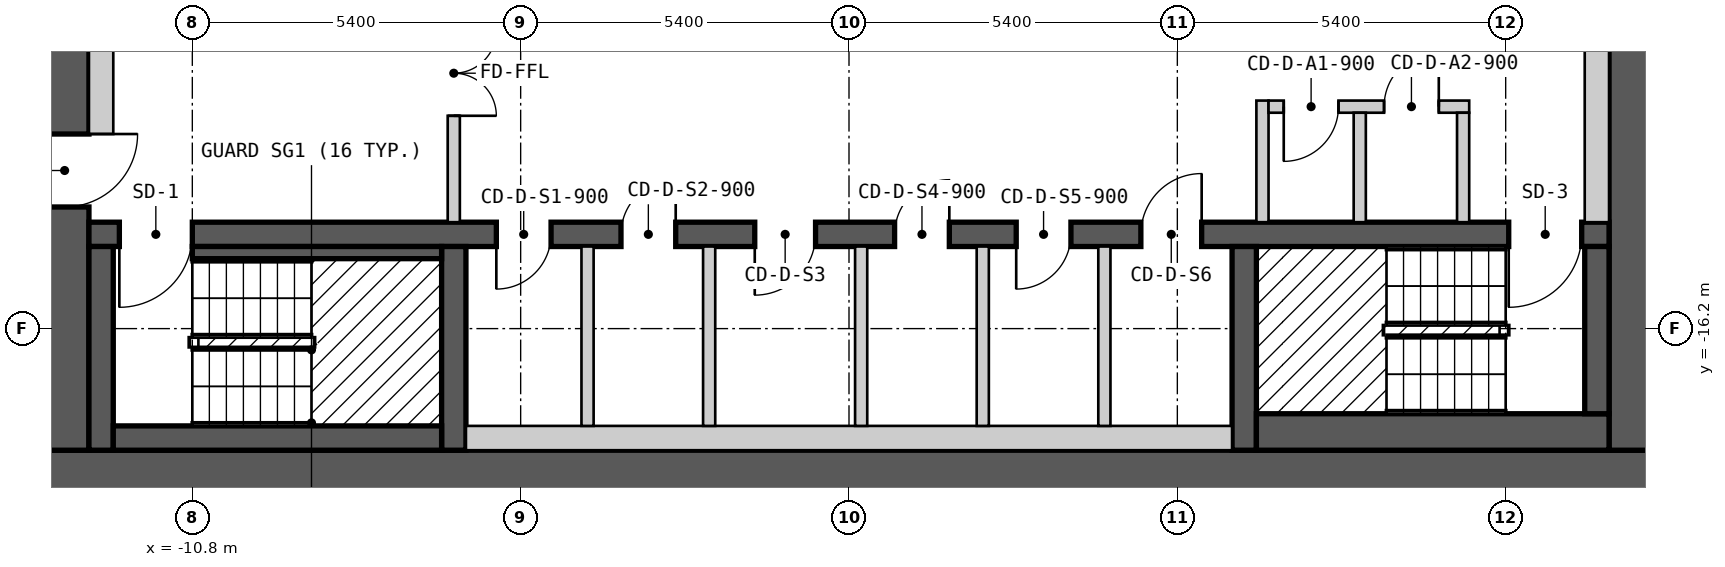
"""IFC4 building model, lengths in metres.
Left out: names, types, materials, properties, quantities, classifications, styles, units other than length and angle.
Written with IfcOpenShell. Run it as: python <this file> out.ifc"""

import sys

from ifc_helpers import new_model, si_unit, direction, frame, frame_2d, origin, place, context, subcontext, project, spatial, rectangle, extrude, element, fill, save


model = new_model("IFC4")
c1 = context("Model", 3, precision=1e-05, world=origin(), true_north=direction((0.0, 1.0)))
c2 = subcontext(c1, "Body", "Model", "MODEL_VIEW")
j1 = project(units=[si_unit("LENGTHUNIT", "METRE"), si_unit("PLANEANGLEUNIT", "RADIAN")], contexts=[c1])
p1 = place(None, origin())
s1 = spatial("IfcSite", under=j1, at=p1, CompositionType="ELEMENT")
p2 = place(p1, origin())
s2 = spatial("IfcBuilding", under=s1, at=p2, CompositionType="ELEMENT")
p3 = place(p2, frame((0.0, 0.0, 135.6)))
s3 = spatial("IfcBuildingStorey", under=s2, at=p3, CompositionType="ELEMENT", Elevation=135.6)
p4 = place(p3, frame((-13.3, -18.6, 0.0), z_axis=(0.0, 0.0, 1.0), x_axis=(1.0, 0.0, 0.0)))
e1 = element("IfcWall", 1, at=p4, inside=s3, PredefinedType="SHEAR", context=c2, shape_type="SweptSolid", body=[
    extrude(rectangle(XDim=26.6, YDim=0.8, at=frame_2d((13.3, 0.0))), origin(), (0.0, 0.0, 1.0), 2.7),
])
p5 = place(p3, frame((-12.9, -18.2, 0.0), z_axis=(0.0, 0.0, 1.0), x_axis=(0.0, 1.0, 0.0)))
e2 = element("IfcWall", 2, at=p5, inside=s3, PredefinedType="SHEAR", context=c2, shape_type="SweptSolid", body=[
    extrude(rectangle(XDim=12.4, YDim=0.8, at=frame_2d((6.2, 0.0))), origin(), (0.0, 0.0, 1.0), 2.7),
])
p6 = place(p5, frame((4.0, 0.0, 0.0)))
e3 = element("IfcOpeningElement", 3, at=p6, cuts=e2, PredefinedType="OPENING", context=c2, shape_type="SweptSolid", body=[
    extrude(rectangle(XDim=1.2, YDim=2.1, at=frame_2d((0.6, 1.05))), frame((0.0, 0.41, 0.0), z_axis=(0.0, -1.0, 0.0), x_axis=(1.0, 0.0, 0.0)), (0.0, 0.0, 1.0), 0.82),
])
p7 = place(p3, frame((12.9, -18.2, 0.0), z_axis=(0.0, 0.0, 1.0), x_axis=(0.0, 1.0, 0.0)))
e4 = element("IfcWall", 4, at=p7, inside=s3, PredefinedType="SHEAR", context=c2, shape_type="SweptSolid", body=[
    extrude(rectangle(XDim=12.4, YDim=0.8, at=frame_2d((6.2, 0.0))), origin(), (0.0, 0.0, 1.0), 2.7),
])
p8 = place(p3, frame((-12.5, -14.65, 0.0), z_axis=(0.0, 0.0, 1.0), x_axis=(1.0, 0.0, 0.0)))
e5 = element("IfcWall", 5, at=p8, inside=s3, PredefinedType="SHEAR", context=c2, shape_type="SweptSolid", body=[
    extrude(rectangle(XDim=25.0, YDim=0.4, at=frame_2d((12.5, 0.0))), origin(), (0.0, 0.0, 1.0), 2.7),
])
p9 = place(p8, frame((1.7, 0.0, 0.0), z_axis=(0.0, 0.0, 1.0), x_axis=(-1.0, 0.0, 0.0)))
e6 = element("IfcOpeningElement", 6, at=p9, cuts=e5, PredefinedType="OPENING", context=c2, shape_type="SweptSolid", body=[
    extrude(rectangle(XDim=1.2, YDim=2.1, at=frame_2d((0.6, 1.05))), frame((0.0, 0.21, 0.0), z_axis=(0.0, -1.0, 0.0), x_axis=(1.0, 0.0, 0.0)), (0.0, 0.0, 1.0), 0.42),
])
p10 = place(p8, frame((24.55, 0.0, 0.0), z_axis=(0.0, 0.0, 1.0), x_axis=(-1.0, 0.0, 0.0)))
e7 = element("IfcOpeningElement", 7, at=p10, cuts=e5, PredefinedType="OPENING", context=c2, shape_type="SweptSolid", body=[
    extrude(rectangle(XDim=1.2, YDim=2.1, at=frame_2d((0.6, 1.05))), frame((0.0, 0.21, 0.0), z_axis=(0.0, -1.0, 0.0), x_axis=(1.0, 0.0, 0.0)), (0.0, 0.0, 1.0), 0.42),
])
p11 = place(p8, frame((7.6, 0.0, 0.0), z_axis=(0.0, 0.0, 1.0), x_axis=(-1.0, 0.0, 0.0)))
e8 = element("IfcOpeningElement", 8, at=p11, cuts=e5, PredefinedType="OPENING", context=c2, shape_type="SweptSolid", body=[
    extrude(rectangle(XDim=0.9, YDim=2.1, at=frame_2d((0.45, 1.05))), frame((0.0, 0.21, 0.0), z_axis=(0.0, -1.0, 0.0), x_axis=(1.0, 0.0, 0.0)), (0.0, 0.0, 1.0), 0.42),
])
p12 = place(p8, frame((9.65, 0.0, 0.0), z_axis=(0.0, 0.0, 1.0), x_axis=(-1.0, 0.0, 0.0)))
e9 = element("IfcOpeningElement", 9, at=p12, cuts=e5, PredefinedType="OPENING", context=c2, shape_type="SweptSolid", body=[
    extrude(rectangle(XDim=0.9, YDim=2.1, at=frame_2d((0.45, 1.05))), frame((0.0, 0.21, 0.0), z_axis=(0.0, -1.0, 0.0), x_axis=(1.0, 0.0, 0.0)), (0.0, 0.0, 1.0), 0.42),
])
p13 = place(p8, frame((11.95, 0.0, 0.0), z_axis=(0.0, 0.0, 1.0), x_axis=(-1.0, 0.0, 0.0)))
e10 = element("IfcOpeningElement", 10, at=p13, cuts=e5, PredefinedType="OPENING", context=c2, shape_type="SweptSolid", body=[
    extrude(rectangle(XDim=1.0, YDim=2.1, at=frame_2d((0.5, 1.05))), frame((0.0, 0.21, 0.0), z_axis=(0.0, -1.0, 0.0), x_axis=(1.0, 0.0, 0.0)), (0.0, 0.0, 1.0), 0.42),
])
p14 = place(p8, frame((14.15, 0.0, 0.0), z_axis=(0.0, 0.0, 1.0), x_axis=(-1.0, 0.0, 0.0)))
e11 = element("IfcOpeningElement", 11, at=p14, cuts=e5, PredefinedType="OPENING", context=c2, shape_type="SweptSolid", body=[
    extrude(rectangle(XDim=0.9, YDim=2.1, at=frame_2d((0.45, 1.05))), frame((0.0, 0.21, 0.0), z_axis=(0.0, -1.0, 0.0), x_axis=(1.0, 0.0, 0.0)), (0.0, 0.0, 1.0), 0.42),
])
p15 = place(p8, frame((16.15, 0.0, 0.0), z_axis=(0.0, 0.0, 1.0), x_axis=(-1.0, 0.0, 0.0)))
e12 = element("IfcOpeningElement", 12, at=p15, cuts=e5, PredefinedType="OPENING", context=c2, shape_type="SweptSolid", body=[
    extrude(rectangle(XDim=0.9, YDim=2.1, at=frame_2d((0.45, 1.05))), frame((0.0, 0.21, 0.0), z_axis=(0.0, -1.0, 0.0), x_axis=(1.0, 0.0, 0.0)), (0.0, 0.0, 1.0), 0.42),
])
p16 = place(p8, frame((18.3, 0.0, 0.0), z_axis=(0.0, 0.0, 1.0), x_axis=(-1.0, 0.0, 0.0)))
e13 = element("IfcOpeningElement", 13, at=p16, cuts=e5, PredefinedType="OPENING", context=c2, shape_type="SweptSolid", body=[
    extrude(rectangle(XDim=1.0, YDim=2.1, at=frame_2d((0.5, 1.05))), frame((0.0, 0.21, 0.0), z_axis=(0.0, -1.0, 0.0), x_axis=(1.0, 0.0, 0.0)), (0.0, 0.0, 1.0), 0.42),
])
for number, where, z_axis, x_axis in (
    (14, (-6.5, -18.2, 0.0), (0.0, 0.0, 1.0), (0.0, 1.0, 0.0)),
    (15, (6.5, -18.2, 0.0), (0.0, 0.0, 1.0), (0.0, 1.0, 0.0)),
):
    element("IfcWall", number, at=place(p3, frame(where, z_axis=z_axis, x_axis=x_axis)), inside=s3, PredefinedType="SHEAR", context=c2, shape_type="SweptSolid", body=[
        extrude(rectangle(XDim=3.35, YDim=0.4, at=frame_2d((1.675, 0.0))), origin(), (0.0, 0.0, 1.0), 2.7),
    ])
p17 = place(p3, frame((-12.3, -18.2, 0.0), z_axis=(0.0, 0.0, 1.0), x_axis=(0.0, 1.0, 0.0)))
e16 = element("IfcWall", 16, at=p17, inside=s3, PredefinedType="SOLIDWALL", context=c2, shape_type="SweptSolid", body=[
    extrude(rectangle(XDim=3.35, YDim=0.4, at=frame_2d((1.675, 0.0))), origin(), (0.0, 0.0, 1.0), 2.7),
])
p18 = place(p3, frame((-12.3, -13.0, 0.0), z_axis=(0.0, 0.0, 1.0), x_axis=(0.0, 1.0, 0.0)))
e17 = element("IfcWall", 17, at=p18, inside=s3, PredefinedType="PARTITIONING", context=c2, shape_type="SweptSolid", body=[
    extrude(rectangle(XDim=3.45, YDim=0.4, at=frame_2d((1.725, 0.0))), origin(), (0.0, 0.0, 1.0), 2.7),
])
p19 = place(p3, frame((-12.1, -18.0, 0.0), z_axis=(0.0, 0.0, 1.0), x_axis=(1.0, 0.0, 0.0)))
e18 = element("IfcWall", 18, at=p19, inside=s3, PredefinedType="SOLIDWALL", context=c2, shape_type="SweptSolid", body=[
    extrude(rectangle(XDim=5.4, YDim=0.4, at=frame_2d((2.7, 0.0))), origin(), (0.0, 0.0, 1.0), 2.7),
])
p20 = place(p3, frame((-10.8, -14.95, 0.0), z_axis=(0.0, 0.0, 1.0), x_axis=(1.0, 0.0, 0.0)))
e19 = element("IfcWall", 19, at=p20, inside=s3, PredefinedType="SOLIDWALL", context=c2, shape_type="SweptSolid", body=[
    extrude(rectangle(XDim=4.1, YDim=0.2, at=frame_2d((2.05, 0.0))), origin(), (0.0, 0.0, 1.0), 2.7),
])
p21 = place(p3, frame((-6.5, -14.45, 0.0), z_axis=(0.0, 0.0, 1.0), x_axis=(0.0, 1.0, 0.0)))
e20 = element("IfcWall", 20, at=p21, inside=s3, PredefinedType="PARTITIONING", context=c2, shape_type="SweptSolid", body=[
    extrude(rectangle(XDim=4.9, YDim=0.2, at=frame_2d((2.45, 0.0))), origin(), (0.0, 0.0, 1.0), 2.7),
])
p22 = place(p21, frame((3.15, 0.0, 0.0), z_axis=(0.0, 0.0, 1.0), x_axis=(-1.0, 0.0, 0.0)))
e21 = element("IfcOpeningElement", 21, at=p22, cuts=e20, PredefinedType="OPENING", context=c2, shape_type="SweptSolid", body=[
    extrude(rectangle(XDim=1.4, YDim=2.1, at=frame_2d((0.7, 1.05))), frame((0.0, 0.11, 0.0), z_axis=(0.0, -1.0, 0.0), x_axis=(1.0, 0.0, 0.0)), (0.0, 0.0, 1.0), 0.22),
])
p23 = place(p3, frame((-6.3, -18.0, 0.0), z_axis=(0.0, 0.0, 1.0), x_axis=(1.0, 0.0, 0.0)))
e22 = element("IfcWall", 22, at=p23, inside=s3, PredefinedType="PARTITIONING", context=c2, shape_type="SweptSolid", body=[
    extrude(rectangle(XDim=12.6, YDim=0.4, at=frame_2d((6.3, 0.0))), origin(), (0.0, 0.0, 1.0), 2.7),
])
for number, where, z_axis, x_axis in (
    (23, (-4.3, -17.8, 0.0), (0.0, 0.0, 1.0), (0.0, 1.0, 0.0)),
    (24, (-2.3, -17.8, 0.0), (0.0, 0.0, 1.0), (0.0, 1.0, 0.0)),
    (25, (0.2, -17.8, 0.0), (0.0, 0.0, 1.0), (0.0, 1.0, 0.0)),
    (26, (2.2, -17.8, 0.0), (0.0, 0.0, 1.0), (0.0, 1.0, 0.0)),
    (27, (4.2, -17.8, 0.0), (0.0, 0.0, 1.0), (0.0, 1.0, 0.0)),
):
    element("IfcWall", number, at=place(p3, frame(where, z_axis=z_axis, x_axis=x_axis)), inside=s3, PredefinedType="PARTITIONING", context=c2, shape_type="SweptSolid", body=[
        extrude(rectangle(XDim=2.95, YDim=0.2, at=frame_2d((1.475, 0.0))), origin(), (0.0, 0.0, 1.0), 2.7),
    ])
p24 = place(p3, frame((6.7, -17.9, 0.0), z_axis=(0.0, 0.0, 1.0), x_axis=(1.0, 0.0, 0.0)))
e28 = element("IfcWall", 28, at=p24, inside=s3, PredefinedType="SOLIDWALL", context=c2, shape_type="SweptSolid", body=[
    extrude(rectangle(XDim=5.8, YDim=0.6, at=frame_2d((2.9, 0.0))), origin(), (0.0, 0.0, 1.0), 2.7),
])
p25 = place(p3, frame((6.8, -14.45, 0.0), z_axis=(0.0, 0.0, 1.0), x_axis=(0.0, 1.0, 0.0)))
e29 = element("IfcWall", 29, at=p25, inside=s3, PredefinedType="PARTITIONING", context=c2, shape_type="SweptSolid", body=[
    extrude(rectangle(XDim=2.0, YDim=0.2, at=frame_2d((1.0, 0.0))), origin(), (0.0, 0.0, 1.0), 2.7),
])
p26 = place(p3, frame((6.9, -12.55, 0.0), z_axis=(0.0, 0.0, 1.0), x_axis=(1.0, 0.0, 0.0)))
e30 = element("IfcWall", 30, at=p26, inside=s3, PredefinedType="PARTITIONING", context=c2, shape_type="SweptSolid", body=[
    extrude(rectangle(XDim=3.3, YDim=0.2, at=frame_2d((1.65, 0.0))), origin(), (0.0, 0.0, 1.0), 2.7),
])
p27 = place(p26, frame((1.15, 0.0, 0.0), z_axis=(0.0, 0.0, 1.0), x_axis=(-1.0, 0.0, 0.0)))
e31 = element("IfcOpeningElement", 31, at=p27, cuts=e30, PredefinedType="OPENING", context=c2, shape_type="SweptSolid", body=[
    extrude(rectangle(XDim=0.9, YDim=2.1, at=frame_2d((0.45, 1.05))), frame((0.0, 0.11, 0.0), z_axis=(0.0, -1.0, 0.0), x_axis=(1.0, 0.0, 0.0)), (0.0, 0.0, 1.0), 0.22),
])
p28 = place(p26, frame((2.8, 0.0, 0.0), z_axis=(0.0, 0.0, 1.0), x_axis=(-1.0, 0.0, 0.0)))
e32 = element("IfcOpeningElement", 32, at=p28, cuts=e30, PredefinedType="OPENING", context=c2, shape_type="SweptSolid", body=[
    extrude(rectangle(XDim=0.9, YDim=2.1, at=frame_2d((0.45, 1.05))), frame((0.0, 0.11, 0.0), z_axis=(0.0, -1.0, 0.0), x_axis=(1.0, 0.0, 0.0)), (0.0, 0.0, 1.0), 0.22),
])
for number, where, z_axis, x_axis in (
    (33, (8.4, -14.45, 0.0), (0.0, 0.0, 1.0), (0.0, 1.0, 0.0)),
    (34, (10.1, -14.45, 0.0), (0.0, 0.0, 1.0), (0.0, 1.0, 0.0)),
):
    element("IfcWall", number, at=place(p3, frame(where, z_axis=z_axis, x_axis=x_axis)), inside=s3, PredefinedType="PARTITIONING", context=c2, shape_type="SweptSolid", body=[
        extrude(rectangle(XDim=1.8, YDim=0.2, at=frame_2d((0.9, 0.0))), origin(), (0.0, 0.0, 1.0), 2.7),
    ])
p29 = place(p3, frame((12.3, -17.6, 0.0), z_axis=(0.0, 0.0, 1.0), x_axis=(0.0, 1.0, 0.0)))
e35 = element("IfcWall", 35, at=p29, inside=s3, PredefinedType="SOLIDWALL", context=c2, shape_type="SweptSolid", body=[
    extrude(rectangle(XDim=2.75, YDim=0.4, at=frame_2d((1.375, 0.0))), origin(), (0.0, 0.0, 1.0), 2.7),
])
p30 = place(p3, frame((12.3, -14.45, 0.0), z_axis=(0.0, 0.0, 1.0), x_axis=(0.0, 1.0, 0.0)))
e36 = element("IfcWall", 36, at=p30, inside=s3, PredefinedType="PARTITIONING", context=c2, shape_type="SweptSolid", body=[
    extrude(rectangle(XDim=8.25, YDim=0.4, at=frame_2d((4.125, 0.0))), origin(), (0.0, 0.0, 1.0), 2.7),
])
p31 = place(p9, origin())
e37 = element("IfcDoor", 37, at=p31, inside=s3, OperationType="SINGLE_SWING_RIGHT", PredefinedType="DOOR", context=c2, shape_type="SweptSolid", body=[
    extrude(rectangle(XDim=1.2, YDim=2.1, at=frame_2d((0.6, 1.05))), frame((0.0, 0.025, 0.0), z_axis=(0.0, -1.0, 0.0), x_axis=(1.0, 0.0, 0.0)), (0.0, 0.0, 1.0), 0.05),
])
fill(e6, e37)
p32 = place(p10, origin())
e38 = element("IfcDoor", 38, at=p32, inside=s3, OperationType="SINGLE_SWING_RIGHT", PredefinedType="DOOR", context=c2, shape_type="SweptSolid", body=[
    extrude(rectangle(XDim=1.2, YDim=2.1, at=frame_2d((0.6, 1.05))), frame((0.0, 0.025, 0.0), z_axis=(0.0, -1.0, 0.0), x_axis=(1.0, 0.0, 0.0)), (0.0, 0.0, 1.0), 0.05),
])
fill(e7, e38)
p33 = place(p6, origin())
e39 = element("IfcDoor", 39, at=p33, inside=s3, OperationType="SINGLE_SWING_RIGHT", PredefinedType="DOOR", context=c2, shape_type="SweptSolid", body=[
    extrude(rectangle(XDim=1.2, YDim=2.1, at=frame_2d((0.6, 1.05))), frame((0.0, 0.025, 0.0), z_axis=(0.0, -1.0, 0.0), x_axis=(1.0, 0.0, 0.0)), (0.0, 0.0, 1.0), 0.05),
])
fill(e3, e39)
p34 = place(p22, origin())
e40 = element("IfcDoor", 40, at=p34, inside=s3, OperationType="DOUBLE_DOOR_SINGLE_SWING", PredefinedType="DOOR", context=c2, shape_type="SweptSolid", body=[
    extrude(rectangle(XDim=1.4, YDim=2.1, at=frame_2d((0.7, 1.05))), frame((0.0, 0.025, 0.0), z_axis=(0.0, -1.0, 0.0), x_axis=(1.0, 0.0, 0.0)), (0.0, 0.0, 1.0), 0.05),
])
fill(e21, e40)
p35 = place(p27, origin())
e41 = element("IfcDoor", 41, at=p35, inside=s3, OperationType="SINGLE_SWING_RIGHT", PredefinedType="DOOR", context=c2, shape_type="SweptSolid", body=[
    extrude(rectangle(XDim=0.9, YDim=2.1, at=frame_2d((0.45, 1.05))), frame((0.0, 0.025, 0.0), z_axis=(0.0, -1.0, 0.0), x_axis=(1.0, 0.0, 0.0)), (0.0, 0.0, 1.0), 0.05),
])
fill(e31, e41)
p36 = place(p28, origin())
e42 = element("IfcDoor", 42, at=p36, inside=s3, OperationType="SINGLE_SWING_LEFT", PredefinedType="DOOR", context=c2, shape_type="SweptSolid", body=[
    extrude(rectangle(XDim=0.9, YDim=2.1, at=frame_2d((0.45, 1.05))), frame((0.0, 0.025, 0.0), z_axis=(0.0, -1.0, 0.0), x_axis=(1.0, 0.0, 0.0)), (0.0, 0.0, 1.0), 0.05),
])
fill(e32, e42)
p37 = place(p11, origin())
e43 = element("IfcDoor", 43, at=p37, inside=s3, OperationType="SINGLE_SWING_RIGHT", PredefinedType="DOOR", context=c2, shape_type="SweptSolid", body=[
    extrude(rectangle(XDim=0.9, YDim=2.1, at=frame_2d((0.45, 1.05))), frame((0.0, 0.025, 0.0), z_axis=(0.0, -1.0, 0.0), x_axis=(1.0, 0.0, 0.0)), (0.0, 0.0, 1.0), 0.05),
])
fill(e8, e43)
p38 = place(p12, origin())
e44 = element("IfcDoor", 44, at=p38, inside=s3, OperationType="SINGLE_SWING_LEFT", PredefinedType="DOOR", context=c2, shape_type="SweptSolid", body=[
    extrude(rectangle(XDim=0.9, YDim=2.1, at=frame_2d((0.45, 1.05))), frame((0.0, 0.025, 0.0), z_axis=(0.0, -1.0, 0.0), x_axis=(1.0, 0.0, 0.0)), (0.0, 0.0, 1.0), 0.05),
])
fill(e9, e44)
p39 = place(p13, origin())
e45 = element("IfcDoor", 45, at=p39, inside=s3, OperationType="SINGLE_SWING_RIGHT", PredefinedType="DOOR", context=c2, shape_type="SweptSolid", body=[
    extrude(rectangle(XDim=1.0, YDim=2.1, at=frame_2d((0.5, 1.05))), frame((0.0, 0.025, 0.0), z_axis=(0.0, -1.0, 0.0), x_axis=(1.0, 0.0, 0.0)), (0.0, 0.0, 1.0), 0.05),
])
fill(e10, e45)
p40 = place(p14, origin())
e46 = element("IfcDoor", 46, at=p40, inside=s3, OperationType="SINGLE_SWING_LEFT", PredefinedType="DOOR", context=c2, shape_type="SweptSolid", body=[
    extrude(rectangle(XDim=0.9, YDim=2.1, at=frame_2d((0.45, 1.05))), frame((0.0, 0.025, 0.0), z_axis=(0.0, -1.0, 0.0), x_axis=(1.0, 0.0, 0.0)), (0.0, 0.0, 1.0), 0.05),
])
fill(e11, e46)
p41 = place(p15, origin())
e47 = element("IfcDoor", 47, at=p41, inside=s3, OperationType="SINGLE_SWING_RIGHT", PredefinedType="DOOR", context=c2, shape_type="SweptSolid", body=[
    extrude(rectangle(XDim=0.9, YDim=2.1, at=frame_2d((0.45, 1.05))), frame((0.0, 0.025, 0.0), z_axis=(0.0, -1.0, 0.0), x_axis=(1.0, 0.0, 0.0)), (0.0, 0.0, 1.0), 0.05),
])
fill(e12, e47)
p42 = place(p16, origin())
e48 = element("IfcDoor", 48, at=p42, inside=s3, OperationType="SINGLE_SWING_LEFT", PredefinedType="DOOR", context=c2, shape_type="SweptSolid", body=[
    extrude(rectangle(XDim=1.0, YDim=2.1, at=frame_2d((0.5, 1.05))), frame((0.0, 0.025, 0.0), z_axis=(0.0, -1.0, 0.0), x_axis=(1.0, 0.0, 0.0)), (0.0, 0.0, 1.0), 0.05),
])
fill(e13, e48)
save(model, sys.argv[1])
